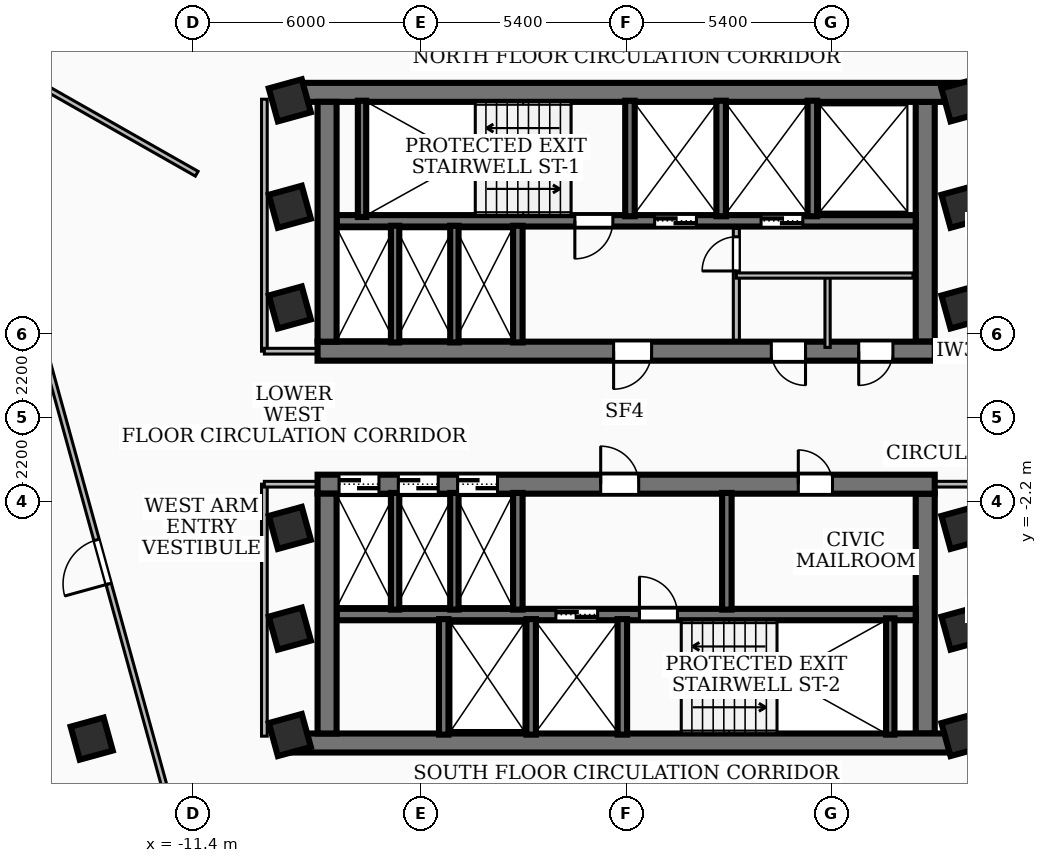
"""IFC4 building model, lengths in metres.
Left out: names, types, materials, properties, quantities, classifications, styles, units other than length and angle.
Written with IfcOpenShell. Run it as: python <this file> out.ifc"""

import sys

from ifc_helpers import new_model, si_unit, direction, frame, frame_2d, origin, origin_2d, place, context, subcontext, project, spatial, rectangle, extrude, element, fill, save


model = new_model("IFC4")
c1 = context("Model", 3, precision=1e-05, world=origin(), true_north=direction((0.0, 1.0)))
c2 = subcontext(c1, "Body", "Model", "MODEL_VIEW")
j1 = project(units=[si_unit("LENGTHUNIT", "METRE"), si_unit("PLANEANGLEUNIT", "RADIAN")], contexts=[c1])
p1 = place(None, origin())
s1 = spatial("IfcSite", under=j1, at=p1, CompositionType="ELEMENT")
p2 = place(p1, origin())
s2 = spatial("IfcBuilding", under=s1, at=p2, CompositionType="ELEMENT")
p3 = place(p2, frame((0.0, 0.0, 134.28)))
s3 = spatial("IfcBuildingStorey", under=s2, at=p3, CompositionType="ELEMENT", Elevation=134.28)
p4 = place(p3, frame((-8.78, 8.56, 0.0), z_axis=(0.0, 0.0, 1.0), x_axis=(1.0, 0.0, 0.0)))
e1 = element("IfcWall", 1, at=p4, inside=s3, PredefinedType="SHEAR", context=c2, shape_type="SweptSolid", body=[
    extrude(rectangle(XDim=17.56, YDim=0.5, at=frame_2d((8.78, 0.0))), origin(), (0.0, 0.0, 1.0), 3.32),
])
p5 = place(p3, frame((8.12, 1.75, 0.0), z_axis=(0.0, 0.0, 1.0), x_axis=(-1.0, 0.0, 0.0)))
e2 = element("IfcWall", 2, at=p5, inside=s3, PredefinedType="SHEAR", context=c2, shape_type="SweptSolid", body=[
    extrude(rectangle(XDim=16.24, YDim=0.5, at=frame_2d((8.12, 0.0))), origin(), (0.0, 0.0, 1.0), 3.32),
])
p6 = place(p5, frame((7.45, 0.0, 0.0)))
e3 = element("IfcOpeningElement", 3, at=p6, cuts=e2, PredefinedType="OPENING", context=c2, shape_type="SweptSolid", body=[
    extrude(rectangle(XDim=1.0, YDim=2.1, at=frame_2d((0.5, 1.05))), frame((0.0, 0.26, 0.0), z_axis=(0.0, -1.0, 0.0), x_axis=(1.0, 0.0, 0.0)), (0.0, 0.0, 1.0), 0.52),
])
p7 = place(p5, frame((3.4, 0.0, 0.0)))
e4 = element("IfcOpeningElement", 4, at=p7, cuts=e2, PredefinedType="OPENING", context=c2, shape_type="SweptSolid", body=[
    extrude(rectangle(XDim=0.9, YDim=2.06, at=frame_2d((0.45, 1.03))), frame((0.0, 0.26, 0.0), z_axis=(0.0, -1.0, 0.0), x_axis=(1.0, 0.0, 0.0)), (0.0, 0.0, 1.0), 0.52),
])
p8 = place(p5, frame((1.1, 0.0, 0.0)))
e5 = element("IfcOpeningElement", 5, at=p8, cuts=e2, PredefinedType="OPENING", context=c2, shape_type="SweptSolid", body=[
    extrude(rectangle(XDim=0.9, YDim=2.06, at=frame_2d((0.45, 1.03))), frame((0.0, 0.26, 0.0), z_axis=(0.0, -1.0, 0.0), x_axis=(1.0, 0.0, 0.0)), (0.0, 0.0, 1.0), 0.52),
])
for number, where, z_axis, x_axis in (
    (6, (-7.87, 2.0, 0.0), (0.0, 0.0, 1.0), (0.0, 1.0, 0.0)),
    (7, (7.87, 8.31, 0.0), (0.0, 0.0, 1.0), (0.0, -1.0, 0.0)),
):
    element("IfcWall", number, at=place(p3, frame(where, z_axis=z_axis, x_axis=x_axis)), inside=s3, PredefinedType="SHEAR", context=c2, shape_type="SweptSolid", body=[
        extrude(rectangle(XDim=6.31, YDim=0.5, at=frame_2d((3.155, 0.0))), origin(), (0.0, 0.0, 1.0), 3.32),
    ])
p9 = place(p3, frame((7.62, 5.18, 0.0), z_axis=(0.0, 0.0, 1.0), x_axis=(-1.0, 0.0, 0.0)))
e8 = element("IfcWall", 8, at=p9, inside=s3, PredefinedType="SOLIDWALL", context=c2, shape_type="SweptSolid", body=[
    extrude(rectangle(XDim=15.24, YDim=0.3, at=frame_2d((7.62, 0.0))), origin(), (0.0, 0.0, 1.0), 3.32),
])
p10 = place(p9, frame((5.77, 0.0, 0.0)))
e9 = element("IfcOpeningElement", 9, at=p10, cuts=e8, PredefinedType="OPENING", context=c2, shape_type="SweptSolid", body=[
    extrude(rectangle(XDim=1.1, YDim=2.15, at=frame_2d((0.55, 1.075))), frame((0.0, 0.16, 0.0), z_axis=(0.0, -1.0, 0.0), x_axis=(1.0, 0.0, 0.0)), (0.0, 0.0, 1.0), 0.32),
])
p11 = place(p9, frame((2.97, 0.0, 0.0)))
e10 = element("IfcOpeningElement", 10, at=p11, cuts=e8, PredefinedType="OPENING", context=c2, shape_type="SweptSolid", body=[
    extrude(rectangle(XDim=1.1, YDim=2.15, at=frame_2d((0.55, 1.075))), frame((0.0, 0.16, 0.0), z_axis=(0.0, -1.0, 0.0), x_axis=(1.0, 0.0, 0.0)), (0.0, 0.0, 1.0), 0.32),
])
p12 = place(p9, frame((7.97, 0.0, 0.0)))
e11 = element("IfcOpeningElement", 11, at=p12, cuts=e8, PredefinedType="OPENING", context=c2, shape_type="SweptSolid", body=[
    extrude(rectangle(XDim=1.0, YDim=2.1, at=frame_2d((0.5, 1.05))), frame((0.0, 0.16, 0.0), z_axis=(0.0, -1.0, 0.0), x_axis=(1.0, 0.0, 0.0)), (0.0, 0.0, 1.0), 0.32),
])
p13 = place(p3, frame((8.78, -8.56, 0.0), z_axis=(0.0, 0.0, 1.0), x_axis=(-1.0, 0.0, 0.0)))
e12 = element("IfcWall", 12, at=p13, inside=s3, PredefinedType="SHEAR", context=c2, shape_type="SweptSolid", body=[
    extrude(rectangle(XDim=17.56, YDim=0.5, at=frame_2d((8.78, 0.0))), origin(), (0.0, 0.0, 1.0), 3.32),
])
p14 = place(p3, frame((-8.12, -1.75, 0.0), z_axis=(0.0, 0.0, 1.0), x_axis=(1.0, 0.0, 0.0)))
e13 = element("IfcWall", 13, at=p14, inside=s3, PredefinedType="SHEAR", context=c2, shape_type="SweptSolid", body=[
    extrude(rectangle(XDim=16.24, YDim=0.5, at=frame_2d((8.12, 0.0))), origin(), (0.0, 0.0, 1.0), 3.32),
])
p15 = place(p14, frame((7.45, 0.0, 0.0)))
e14 = element("IfcOpeningElement", 14, at=p15, cuts=e13, PredefinedType="OPENING", context=c2, shape_type="SweptSolid", body=[
    extrude(rectangle(XDim=1.0, YDim=2.1, at=frame_2d((0.5, 1.05))), frame((0.0, 0.26, 0.0), z_axis=(0.0, -1.0, 0.0), x_axis=(1.0, 0.0, 0.0)), (0.0, 0.0, 1.0), 0.52),
])
p16 = place(p14, frame((12.65, 0.0, 0.0)))
e15 = element("IfcOpeningElement", 15, at=p16, cuts=e13, PredefinedType="OPENING", context=c2, shape_type="SweptSolid", body=[
    extrude(rectangle(XDim=0.9, YDim=2.06, at=frame_2d((0.45, 1.03))), frame((0.0, 0.26, 0.0), z_axis=(0.0, -1.0, 0.0), x_axis=(1.0, 0.0, 0.0)), (0.0, 0.0, 1.0), 0.52),
])
p17 = place(p14, frame((0.565, 0.0, 0.0)))
e16 = element("IfcOpeningElement", 16, at=p17, cuts=e13, PredefinedType="OPENING", context=c2, shape_type="SweptSolid", body=[
    extrude(rectangle(XDim=1.05, YDim=2.15, at=frame_2d((0.525, 1.075))), frame((0.0, 0.26, 0.0), z_axis=(0.0, -1.0, 0.0), x_axis=(1.0, 0.0, 0.0)), (0.0, 0.0, 1.0), 0.52),
])
p18 = place(p14, frame((2.125, 0.0, 0.0)))
e17 = element("IfcOpeningElement", 17, at=p18, cuts=e13, PredefinedType="OPENING", context=c2, shape_type="SweptSolid", body=[
    extrude(rectangle(XDim=1.05, YDim=2.15, at=frame_2d((0.525, 1.075))), frame((0.0, 0.26, 0.0), z_axis=(0.0, -1.0, 0.0), x_axis=(1.0, 0.0, 0.0)), (0.0, 0.0, 1.0), 0.52),
])
p19 = place(p14, frame((3.685, 0.0, 0.0)))
e18 = element("IfcOpeningElement", 18, at=p19, cuts=e13, PredefinedType="OPENING", context=c2, shape_type="SweptSolid", body=[
    extrude(rectangle(XDim=1.05, YDim=2.15, at=frame_2d((0.525, 1.075))), frame((0.0, 0.26, 0.0), z_axis=(0.0, -1.0, 0.0), x_axis=(1.0, 0.0, 0.0)), (0.0, 0.0, 1.0), 0.52),
])
for number, where, z_axis, x_axis in (
    (19, (-7.87, -8.31, 0.0), (0.0, 0.0, 1.0), (0.0, 1.0, 0.0)),
    (20, (7.87, -2.0, 0.0), (0.0, 0.0, 1.0), (0.0, -1.0, 0.0)),
):
    element("IfcWall", number, at=place(p3, frame(where, z_axis=z_axis, x_axis=x_axis)), inside=s3, PredefinedType="SHEAR", context=c2, shape_type="SweptSolid", body=[
        extrude(rectangle(XDim=6.31, YDim=0.5, at=frame_2d((3.155, 0.0))), origin(), (0.0, 0.0, 1.0), 3.32),
    ])
p20 = place(p3, frame((-7.62, -5.18, 0.0), z_axis=(0.0, 0.0, 1.0), x_axis=(1.0, 0.0, 0.0)))
e21 = element("IfcWall", 21, at=p20, inside=s3, PredefinedType="SOLIDWALL", context=c2, shape_type="SweptSolid", body=[
    extrude(rectangle(XDim=15.24, YDim=0.3, at=frame_2d((7.62, 0.0))), origin(), (0.0, 0.0, 1.0), 3.32),
])
p21 = place(p20, frame((5.77, 0.0, 0.0)))
e22 = element("IfcOpeningElement", 22, at=p21, cuts=e21, PredefinedType="OPENING", context=c2, shape_type="SweptSolid", body=[
    extrude(rectangle(XDim=1.1, YDim=2.15, at=frame_2d((0.55, 1.075))), frame((0.0, 0.16, 0.0), z_axis=(0.0, -1.0, 0.0), x_axis=(1.0, 0.0, 0.0)), (0.0, 0.0, 1.0), 0.32),
])
p22 = place(p20, frame((7.97, 0.0, 0.0)))
e23 = element("IfcOpeningElement", 23, at=p22, cuts=e21, PredefinedType="OPENING", context=c2, shape_type="SweptSolid", body=[
    extrude(rectangle(XDim=1.0, YDim=2.1, at=frame_2d((0.5, 1.05))), frame((0.0, 0.16, 0.0), z_axis=(0.0, -1.0, 0.0), x_axis=(1.0, 0.0, 0.0)), (0.0, 0.0, 1.0), 0.32),
])
for number, where, z_axis, x_axis in (
    (24, (-6.95, 5.28, 0.0), (0.0, 0.0, 1.0), (0.0, 1.0, 0.0)),
    (25, (6.95, -8.34, 0.0), (0.0, 0.0, 1.0), (0.0, 1.0, 0.0)),
):
    element("IfcWall", number, at=place(p3, frame(where, z_axis=z_axis, x_axis=x_axis)), inside=s3, PredefinedType="SOLIDWALL", context=c2, shape_type="SweptSolid", body=[
        extrude(rectangle(XDim=3.06, YDim=0.22, at=frame_2d((1.53, 0.0))), origin(), (0.0, 0.0, 1.0), 3.32),
    ])
for number, where, z_axis, x_axis in (
    (26, (0.1, 5.3, 0.0), (0.0, 0.0, 1.0), (0.0, 1.0, 0.0)),
    (27, (2.5, 5.3, 0.0), (0.0, 0.0, 1.0), (0.0, 1.0, 0.0)),
    (28, (4.9, 5.3, 0.0), (0.0, 0.0, 1.0), (0.0, 1.0, 0.0)),
):
    element("IfcWall", number, at=place(p3, frame(where, z_axis=z_axis, x_axis=x_axis)), inside=s3, PredefinedType="SOLIDWALL", context=c2, shape_type="SweptSolid", body=[
        extrude(rectangle(XDim=3.04, YDim=0.25, at=frame_2d((1.52, 0.0))), origin(), (0.0, 0.0, 1.0), 3.32),
    ])
p23 = place(p3, frame((-2.85, 1.98, 0.0), z_axis=(0.0, 0.0, 1.0), x_axis=(0.0, 1.0, 0.0)))
e29 = element("IfcWall", 29, at=p23, inside=s3, PredefinedType="SOLIDWALL", context=c2, shape_type="SweptSolid", body=[
    extrude(rectangle(XDim=3.07, YDim=0.25, at=frame_2d((1.535, 0.0))), origin(), (0.0, 0.0, 1.0), 3.32),
])
for number, where, z_axis, x_axis in (
    (30, (-0.1, -8.34, 0.0), (0.0, 0.0, 1.0), (0.0, 1.0, 0.0)),
    (31, (-2.5, -8.34, 0.0), (0.0, 0.0, 1.0), (0.0, 1.0, 0.0)),
    (32, (-4.8, -8.34, 0.0), (0.0, 0.0, 1.0), (0.0, 1.0, 0.0)),
):
    element("IfcWall", number, at=place(p3, frame(where, z_axis=z_axis, x_axis=x_axis)), inside=s3, PredefinedType="SOLIDWALL", context=c2, shape_type="SweptSolid", body=[
        extrude(rectangle(XDim=3.04, YDim=0.25, at=frame_2d((1.52, 0.0))), origin(), (0.0, 0.0, 1.0), 3.32),
    ])
for number, where, z_axis, x_axis in (
    (33, (-2.85, -5.05, 0.0), (0.0, 0.0, 1.0), (0.0, 1.0, 0.0)),
    (34, (2.65, -5.05, 0.0), (0.0, 0.0, 1.0), (0.0, 1.0, 0.0)),
):
    element("IfcWall", number, at=place(p3, frame(where, z_axis=z_axis, x_axis=x_axis)), inside=s3, PredefinedType="SOLIDWALL", context=c2, shape_type="SweptSolid", body=[
        extrude(rectangle(XDim=3.07, YDim=0.25, at=frame_2d((1.535, 0.0))), origin(), (0.0, 0.0, 1.0), 3.32),
    ])
for number, where, z_axis, x_axis in (
    (35, (-6.08, 1.98, 0.0), (0.0, 0.0, 1.0), (0.0, 1.0, 0.0)),
    (36, (-4.52, 1.98, 0.0), (0.0, 0.0, 1.0), (0.0, 1.0, 0.0)),
    (37, (-6.08, -5.05, 0.0), (0.0, 0.0, 1.0), (0.0, 1.0, 0.0)),
    (38, (-4.52, -5.05, 0.0), (0.0, 0.0, 1.0), (0.0, 1.0, 0.0)),
):
    element("IfcWall", number, at=place(p3, frame(where, z_axis=z_axis, x_axis=x_axis)), inside=s3, PredefinedType="SOLIDWALL", context=c2, shape_type="SweptSolid", body=[
        extrude(rectangle(XDim=3.07, YDim=0.22, at=frame_2d((1.535, 0.0))), origin(), (0.0, 0.0, 1.0), 3.32),
    ])
for number, where, z_axis, x_axis in (
    (39, (-8.85, -5.55, 0.0), (0.0, 0.0, 1.0), (0.964, 0.266, 0.0)),
    (40, (-8.85, -2.9, 0.0), (0.0, 0.0, 1.0), (0.964, 0.266, 0.0)),
    (41, (-8.85, 2.9, 0.0), (0.0, 0.0, 1.0), (0.964, 0.266, 0.0)),
    (42, (-8.85, 5.55, 0.0), (0.0, 0.0, 1.0), (0.964, 0.266, 0.0)),
    (43, (8.85, -5.55, 0.0), (0.0, 0.0, 1.0), (0.964, 0.266, 0.0)),
    (44, (8.85, -2.9, 0.0), (0.0, 0.0, 1.0), (0.964, 0.266, 0.0)),
    (45, (8.85, 2.9, 0.0), (0.0, 0.0, 1.0), (0.964, 0.266, 0.0)),
    (46, (8.85, 5.55, 0.0), (0.0, 0.0, 1.0), (0.964, 0.266, 0.0)),
    (47, (-8.85, 8.35, 0.0), (0.0, 0.0, 1.0), (0.964, 0.266, 0.0)),
    (48, (8.85, -8.35, 0.0), (0.0, 0.0, 1.0), (0.964, 0.266, 0.0)),
    (49, (8.85, 8.35, 0.0), (0.0, 0.0, 1.0), (0.964, 0.266, 0.0)),
    (50, (-8.85, -8.35, 0.0), (0.0, 0.0, 1.0), (0.964, 0.266, 0.0)),
    (51, (-14.064, -8.445, 0.0), (0.0, 0.0, 1.0), (0.964, 0.266, 0.0)),
):
    element("IfcColumn", number, at=place(p3, frame(where, z_axis=z_axis, x_axis=x_axis)), inside=s3, PredefinedType="COLUMN", context=c2, shape_type="SweptSolid", body=[
        extrude(rectangle(XDim=0.9, YDim=0.9, at=origin_2d()), origin(), (0.0, 0.0, 1.0), 3.6),
    ])
p24 = place(p3, frame((2.9, 2.04, 0.0), z_axis=(0.0, 0.0, 1.0), x_axis=(0.0, 1.0, 0.0)))
e52 = element("IfcWall", 52, at=p24, inside=s3, PredefinedType="PARTITIONING", context=c2, shape_type="SweptSolid", body=[
    extrude(rectangle(XDim=2.94, YDim=0.16, at=frame_2d((1.47, 0.0))), origin(), (0.0, 0.0, 1.0), 2.55),
])
p25 = place(p24, frame((1.82, 0.0, 0.0)))
e53 = element("IfcOpeningElement", 53, at=p25, cuts=e52, PredefinedType="OPENING", context=c2, shape_type="SweptSolid", body=[
    extrude(rectangle(XDim=0.9, YDim=2.06, at=frame_2d((0.45, 1.03))), frame((0.0, 0.09, 0.0), z_axis=(0.0, -1.0, 0.0), x_axis=(1.0, 0.0, 0.0)), (0.0, 0.0, 1.0), 0.18),
])
p26 = place(p3, frame((2.9, 3.74, 0.0), z_axis=(0.0, 0.0, 1.0), x_axis=(1.0, 0.0, 0.0)))
e54 = element("IfcWall", 54, at=p26, inside=s3, PredefinedType="PARTITIONING", context=c2, shape_type="SweptSolid", body=[
    extrude(rectangle(XDim=4.65, YDim=0.138, at=frame_2d((2.325, 0.0))), origin(), (0.0, 0.0, 1.0), 3.32),
])
p27 = place(p3, frame((5.3, 1.85, 0.0), z_axis=(0.0, 0.0, 1.0), x_axis=(0.0, 1.0, 0.0)))
e55 = element("IfcWall", 55, at=p27, inside=s3, PredefinedType="PARTITIONING", context=c2, shape_type="SweptSolid", body=[
    extrude(rectangle(XDim=1.89, YDim=0.138, at=frame_2d((0.945, 0.0))), origin(), (0.0, 0.0, 1.0), 2.55),
])
p28 = place(p3, frame((-9.52, 1.75, 0.0), z_axis=(0.0, 0.0, 1.0), x_axis=(0.0, 1.0, 0.0)))
e56 = element("IfcWall", 56, at=p28, inside=s3, PredefinedType="PARTITIONING", context=c2, shape_type="SweptSolid", body=[
    extrude(rectangle(XDim=6.63, YDim=0.15, at=frame_2d((3.315, 0.0))), origin(), (0.0, 0.0, 1.0), 2.55),
])
p29 = place(p3, frame((-7.85, 1.75, 0.0), z_axis=(0.0, 0.0, 1.0), x_axis=(-1.0, 0.0, 0.0)))
e57 = element("IfcWall", 57, at=p29, inside=s3, PredefinedType="PARTITIONING", context=c2, shape_type="SweptSolid", body=[
    extrude(rectangle(XDim=1.67, YDim=0.15, at=frame_2d((0.835, 0.0))), origin(), (0.0, 0.0, 1.0), 2.55),
])
p30 = place(p3, frame((-9.52, -8.38, 0.0), z_axis=(0.0, 0.0, 1.0), x_axis=(0.0, 1.0, 0.0)))
e58 = element("IfcWall", 58, at=p30, inside=s3, PredefinedType="PARTITIONING", context=c2, shape_type="SweptSolid", body=[
    extrude(rectangle(XDim=6.63, YDim=0.15, at=frame_2d((3.315, 0.0))), origin(), (0.0, 0.0, 1.0), 2.55),
])
for number, where, z_axis, x_axis in (
    (59, (-7.85, -1.75, 0.0), (0.0, 0.0, 1.0), (-1.0, 0.0, 0.0)),
    (60, (7.85, 1.75, 0.0), (0.0, 0.0, 1.0), (1.0, 0.0, 0.0)),
    (61, (7.85, -1.75, 0.0), (0.0, 0.0, 1.0), (1.0, 0.0, 0.0)),
):
    element("IfcWall", number, at=place(p3, frame(where, z_axis=z_axis, x_axis=x_axis)), inside=s3, PredefinedType="PARTITIONING", context=c2, shape_type="SweptSolid", body=[
        extrude(rectangle(XDim=1.67, YDim=0.15, at=frame_2d((0.835, 0.0))), origin(), (0.0, 0.0, 1.0), 2.55),
    ])
p31 = place(p3, frame((-11.3, 6.419, 0.0), z_axis=(0.0, 0.0, 1.0), x_axis=(-0.869475469758, 0.493976120363, 0.0)))
e62 = element("IfcWall", 62, at=p31, inside=s3, PredefinedType="PARTITIONING", context=c2, shape_type="SweptSolid", body=[
    extrude(rectangle(XDim=6.679, YDim=0.145, at=frame_2d((3.339, 0.0))), origin(), (0.0, 0.0, 1.0), 3.32),
])
p32 = place(p3, frame((-10.999, -13.879, 0.0), z_axis=(0.0, 0.0, 1.0), x_axis=(-0.26558288107, 0.964088031915, 0.0)))
e63 = element("IfcWall", 63, at=p32, inside=s3, PredefinedType="PARTITIONING", context=c2, shape_type="SweptSolid", body=[
    extrude(rectangle(XDim=20.479, YDim=0.145, at=frame_2d((10.24, 0.0))), origin(), (0.0, 0.0, 1.0), 2.55),
])
p33 = place(p32, frame((9.86, 0.0, 0.0)))
e64 = element("IfcOpeningElement", 64, at=p33, cuts=e63, PredefinedType="OPENING", context=c2, shape_type="SweptSolid", body=[
    extrude(rectangle(XDim=1.2, YDim=2.1, at=frame_2d((0.6, 1.05))), frame((0.0, 0.083, 0.0), z_axis=(0.0, -1.0, 0.0), x_axis=(1.0, 0.0, 0.0)), (0.0, 0.0, 1.0), 0.165),
])
p34 = place(p6, origin())
e65 = element("IfcDoor", 65, at=p34, inside=s3, OperationType="SINGLE_SWING_RIGHT", PredefinedType="DOOR", context=c2, shape_type="SweptSolid", body=[
    extrude(rectangle(XDim=1.0, YDim=2.1, at=frame_2d((0.5, 1.05))), frame((0.0, 0.025, 0.0), z_axis=(0.0, -1.0, 0.0), x_axis=(1.0, 0.0, 0.0)), (0.0, 0.0, 1.0), 0.05),
])
fill(e3, e65)
p35 = place(p15, origin())
e66 = element("IfcDoor", 66, at=p35, inside=s3, OperationType="SINGLE_SWING_LEFT", PredefinedType="DOOR", context=c2, shape_type="SweptSolid", body=[
    extrude(rectangle(XDim=1.0, YDim=2.1, at=frame_2d((0.5, 1.05))), frame((0.0, 0.025, 0.0), z_axis=(0.0, -1.0, 0.0), x_axis=(1.0, 0.0, 0.0)), (0.0, 0.0, 1.0), 0.05),
])
fill(e14, e66)
p36 = place(p10, origin())
e67 = element("IfcDoor", 67, at=p36, inside=s3, OperationType="DOUBLE_DOOR_SLIDING", PredefinedType="DOOR", context=c2, shape_type="SweptSolid", body=[
    extrude(rectangle(XDim=1.1, YDim=2.15, at=frame_2d((0.55, 1.075))), frame((0.0, 0.025, 0.0), z_axis=(0.0, -1.0, 0.0), x_axis=(1.0, 0.0, 0.0)), (0.0, 0.0, 1.0), 0.05),
])
fill(e9, e67)
p37 = place(p11, origin())
e68 = element("IfcDoor", 68, at=p37, inside=s3, OperationType="DOUBLE_DOOR_SLIDING", PredefinedType="DOOR", context=c2, shape_type="SweptSolid", body=[
    extrude(rectangle(XDim=1.1, YDim=2.15, at=frame_2d((0.55, 1.075))), frame((0.0, 0.025, 0.0), z_axis=(0.0, -1.0, 0.0), x_axis=(1.0, 0.0, 0.0)), (0.0, 0.0, 1.0), 0.05),
])
fill(e10, e68)
p38 = place(p12, origin())
e69 = element("IfcDoor", 69, at=p38, inside=s3, OperationType="SINGLE_SWING_RIGHT", PredefinedType="DOOR", context=c2, shape_type="SweptSolid", body=[
    extrude(rectangle(XDim=1.0, YDim=2.1, at=frame_2d((0.5, 1.05))), frame((0.0, 0.025, 0.0), z_axis=(0.0, -1.0, 0.0), x_axis=(1.0, 0.0, 0.0)), (0.0, 0.0, 1.0), 0.05),
])
fill(e11, e69)
p39 = place(p21, origin())
e70 = element("IfcDoor", 70, at=p39, inside=s3, OperationType="DOUBLE_DOOR_SLIDING", PredefinedType="DOOR", context=c2, shape_type="SweptSolid", body=[
    extrude(rectangle(XDim=1.1, YDim=2.15, at=frame_2d((0.55, 1.075))), frame((0.0, 0.025, 0.0), z_axis=(0.0, -1.0, 0.0), x_axis=(1.0, 0.0, 0.0)), (0.0, 0.0, 1.0), 0.05),
])
fill(e22, e70)
p40 = place(p22, origin())
e71 = element("IfcDoor", 71, at=p40, inside=s3, OperationType="SINGLE_SWING_LEFT", PredefinedType="DOOR", context=c2, shape_type="SweptSolid", body=[
    extrude(rectangle(XDim=1.0, YDim=2.1, at=frame_2d((0.5, 1.05))), frame((0.0, 0.025, 0.0), z_axis=(0.0, -1.0, 0.0), x_axis=(1.0, 0.0, 0.0)), (0.0, 0.0, 1.0), 0.05),
])
fill(e23, e71)
p41 = place(p16, origin())
e72 = element("IfcDoor", 72, at=p41, inside=s3, OperationType="SINGLE_SWING_LEFT", PredefinedType="DOOR", context=c2, shape_type="SweptSolid", body=[
    extrude(rectangle(XDim=0.9, YDim=2.06, at=frame_2d((0.45, 1.03))), frame((0.0, 0.025, 0.0), z_axis=(0.0, -1.0, 0.0), x_axis=(1.0, 0.0, 0.0)), (0.0, 0.0, 1.0), 0.05),
])
fill(e15, e72)
p42 = place(p17, origin())
e73 = element("IfcDoor", 73, at=p42, inside=s3, OperationType="DOUBLE_DOOR_SLIDING", PredefinedType="DOOR", context=c2, shape_type="SweptSolid", body=[
    extrude(rectangle(XDim=1.05, YDim=2.15, at=frame_2d((0.525, 1.075))), frame((0.0, 0.025, 0.0), z_axis=(0.0, -1.0, 0.0), x_axis=(1.0, 0.0, 0.0)), (0.0, 0.0, 1.0), 0.05),
])
fill(e16, e73)
p43 = place(p18, origin())
e74 = element("IfcDoor", 74, at=p43, inside=s3, OperationType="DOUBLE_DOOR_SLIDING", PredefinedType="DOOR", context=c2, shape_type="SweptSolid", body=[
    extrude(rectangle(XDim=1.05, YDim=2.15, at=frame_2d((0.525, 1.075))), frame((0.0, 0.025, 0.0), z_axis=(0.0, -1.0, 0.0), x_axis=(1.0, 0.0, 0.0)), (0.0, 0.0, 1.0), 0.05),
])
fill(e17, e74)
p44 = place(p19, origin())
e75 = element("IfcDoor", 75, at=p44, inside=s3, OperationType="DOUBLE_DOOR_SLIDING", PredefinedType="DOOR", context=c2, shape_type="SweptSolid", body=[
    extrude(rectangle(XDim=1.05, YDim=2.15, at=frame_2d((0.525, 1.075))), frame((0.0, 0.025, 0.0), z_axis=(0.0, -1.0, 0.0), x_axis=(1.0, 0.0, 0.0)), (0.0, 0.0, 1.0), 0.05),
])
fill(e18, e75)
p45 = place(p7, origin())
e76 = element("IfcDoor", 76, at=p45, inside=s3, OperationType="SINGLE_SWING_LEFT", PredefinedType="DOOR", context=c2, shape_type="SweptSolid", body=[
    extrude(rectangle(XDim=0.9, YDim=2.06, at=frame_2d((0.45, 1.03))), frame((0.0, 0.025, 0.0), z_axis=(0.0, -1.0, 0.0), x_axis=(1.0, 0.0, 0.0)), (0.0, 0.0, 1.0), 0.05),
])
fill(e4, e76)
p46 = place(p8, origin())
e77 = element("IfcDoor", 77, at=p46, inside=s3, OperationType="SINGLE_SWING_RIGHT", PredefinedType="DOOR", context=c2, shape_type="SweptSolid", body=[
    extrude(rectangle(XDim=0.9, YDim=2.06, at=frame_2d((0.45, 1.03))), frame((0.0, 0.025, 0.0), z_axis=(0.0, -1.0, 0.0), x_axis=(1.0, 0.0, 0.0)), (0.0, 0.0, 1.0), 0.05),
])
fill(e5, e77)
p47 = place(p25, origin())
e78 = element("IfcDoor", 78, at=p47, inside=s3, OperationType="SINGLE_SWING_LEFT", PredefinedType="DOOR", context=c2, shape_type="SweptSolid", body=[
    extrude(rectangle(XDim=0.9, YDim=2.06, at=frame_2d((0.45, 1.03))), frame((0.0, 0.025, 0.0), z_axis=(0.0, -1.0, 0.0), x_axis=(1.0, 0.0, 0.0)), (0.0, 0.0, 1.0), 0.05),
])
fill(e53, e78)
p48 = place(p33, origin())
e79 = element("IfcDoor", 79, at=p48, inside=s3, OperationType="SINGLE_SWING_LEFT", PredefinedType="DOOR", context=c2, shape_type="SweptSolid", body=[
    extrude(rectangle(XDim=1.2, YDim=2.1, at=frame_2d((0.6, 1.05))), frame((0.0, 0.025, 0.0), z_axis=(0.0, -1.0, 0.0), x_axis=(1.0, 0.0, 0.0)), (0.0, 0.0, 1.0), 0.05),
])
fill(e64, e79)
save(model, sys.argv[1])
